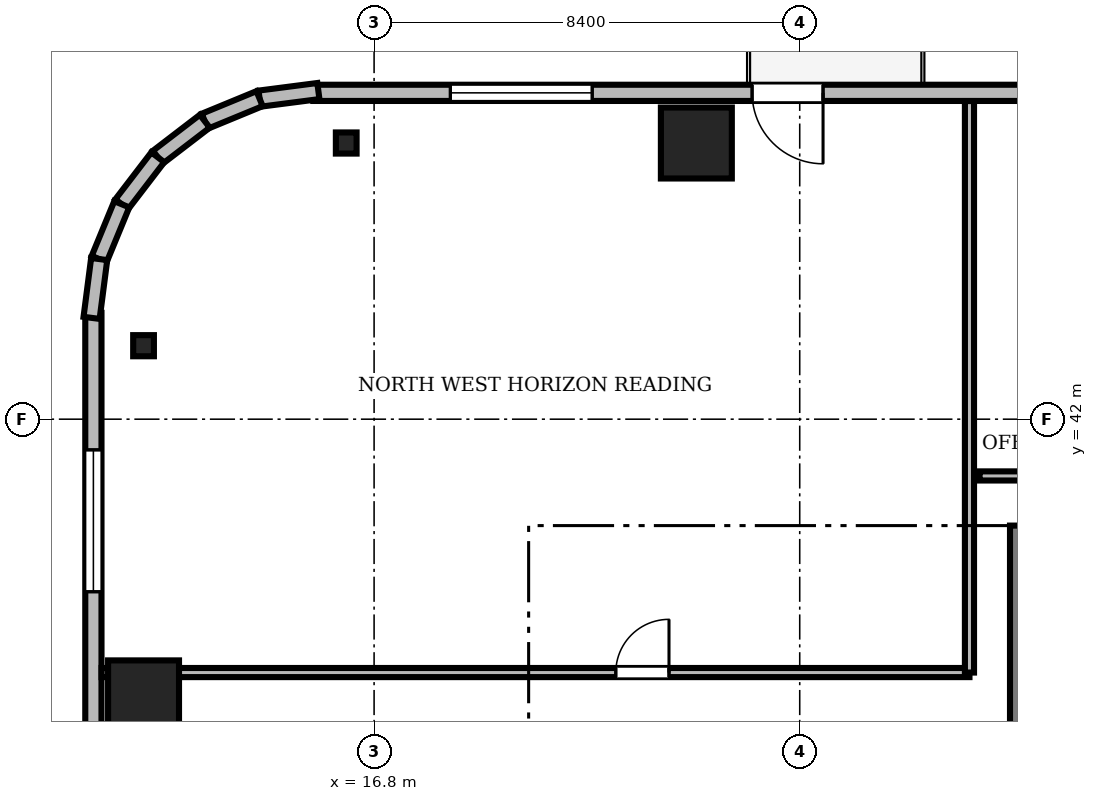
"""IFC4 building model, lengths in metres.
Left out: names, types, materials, properties, quantities, classifications, styles, units other than length and angle.
Written with IfcOpenShell. Run it as: python <this file> out.ifc"""

import sys

from ifc_helpers import new_model, si_unit, direction, frame, frame_2d, origin, origin_2d, place, context, subcontext, project, spatial, rectangle, i_section, extrude, source, transform, mapped, element, fill, save


model = new_model("IFC4")
c1 = context("Model", 3, precision=1e-05, world=origin(), true_north=direction((0.0, 1.0)))
c2 = subcontext(c1, "Body", "Model", "MODEL_VIEW")
j1 = project(units=[si_unit("LENGTHUNIT", "METRE"), si_unit("PLANEANGLEUNIT", "RADIAN")], contexts=[c1])
p1 = place(None, origin())
s1 = spatial("IfcSite", under=j1, at=p1, CompositionType="ELEMENT")
p2 = place(p1, origin())
s2 = spatial("IfcBuilding", under=s1, at=p2, CompositionType="ELEMENT")
p3 = place(p2, frame((0.0, 0.0, 172.2)))
s3 = spatial("IfcBuildingStorey", under=s2, at=p3, CompositionType="ELEMENT", Elevation=172.2)
m1 = source(origin(), c2, "Body", "SweptSolid", [
    extrude(rectangle(XDim=1.4, YDim=1.4, at=origin_2d()), origin(), (0.0, 0.0, 1.0), 4.78),
])
for number, where, z_axis, x_axis in (
    (1, (23.16, 47.45, 0.0), (0.0, 0.0, 1.0), (1.0, 0.0, 0.0)),
    (2, (12.25, 36.54, 0.0), (0.0, 0.0, 1.0), (1.0, 0.0, 0.0)),
):
    element("IfcColumn", number, at=place(p3, frame(where, z_axis=z_axis, x_axis=x_axis)), inside=s3, PredefinedType="COLUMN", context=c2, shape_type="MappedRepresentation", body=[
        mapped(m1, transform((0.0, 0.0, 0.0), scale=1.0)),
    ])
m2 = source(origin(), c2, "Body", "SweptSolid", [
    extrude(i_section(OverallWidth=0.409, OverallDepth=0.417, WebThickness=0.021, FlangeThickness=0.033, FilletRadius=0.015, at=origin_2d()), origin(), (0.0, 0.0, 1.0), 4.78),
])
for number, where, z_axis, x_axis in (
    (3, (16.25, 47.45, 0.0), (0.0, 0.0, 1.0), (1.0, 0.0, 0.0)),
    (4, (12.25, 43.45, 0.0), (0.0, 0.0, 1.0), (1.0, 0.0, 0.0)),
):
    element("IfcColumn", number, at=place(p3, frame(where, z_axis=z_axis, x_axis=x_axis)), inside=s3, PredefinedType="COLUMN", context=c2, shape_type="MappedRepresentation", body=[
        mapped(m2, transform((0.0, 0.0, 0.0), scale=1.0)),
    ])
m3 = source(origin(), c2, "Body", "SweptSolid", [
    extrude(rectangle(XDim=15.6, YDim=0.32, at=frame_2d((7.8, 0.0))), origin(), (0.0, 0.0, 1.0), 4.78),
])
p4 = place(p3, frame((31.2, 48.44, 0.0), z_axis=(0.0, 0.0, 1.0), x_axis=(-1.0, 0.0, 0.0)))
e5 = element("IfcWall", 5, at=p4, inside=s3, PredefinedType="SOLIDWALL", context=c2, shape_type="MappedRepresentation", body=[
    mapped(m3, transform((0.0, 0.0, 0.0), scale=1.0)),
])
m4 = source(origin(), c2, "Body", "SweptSolid", [
    extrude(rectangle(XDim=1.4, YDim=2.3, at=frame_2d((0.7, 1.15))), frame((0.0, 0.17, 0.0), z_axis=(0.0, -1.0, 0.0), x_axis=(1.0, 0.0, 0.0)), (0.0, 0.0, 1.0), 0.34),
])
p5 = place(p4, frame((5.54, 0.0, 0.0)))
e6 = element("IfcOpeningElement", 6, at=p5, cuts=e5, PredefinedType="OPENING", context=c2, shape_type="MappedRepresentation", body=[
    mapped(m4, transform((0.0, 0.0, 0.0), scale=1.0)),
])
m5 = source(origin(), c2, "Body", "SweptSolid", [
    extrude(rectangle(XDim=2.8, YDim=2.4, at=frame_2d((1.4, 1.2))), frame((0.0, 0.17, 0.0), z_axis=(0.0, -1.0, 0.0), x_axis=(1.0, 0.0, 0.0)), (0.0, 0.0, 1.0), 0.34),
])
p6 = place(p4, frame((10.095, 0.0, 0.72)))
e7 = element("IfcOpeningElement", 7, at=p6, cuts=e5, PredefinedType="OPENING", context=c2, shape_type="MappedRepresentation", body=[
    mapped(m5, transform((0.0, 0.0, 0.0), scale=1.0)),
])
m6 = source(origin(), c2, "Body", "SweptSolid", [
    extrude(rectangle(XDim=15.6, YDim=0.32, at=frame_2d((7.8, 0.0))), origin(), (0.0, 0.0, 1.0), 4.78),
])
p7 = place(p3, frame((11.26, 44.1, 0.0), z_axis=(0.0, 0.0, 1.0), x_axis=(0.0, -1.0, 0.0)))
e8 = element("IfcWall", 8, at=p7, inside=s3, PredefinedType="SOLIDWALL", context=c2, shape_type="MappedRepresentation", body=[
    mapped(m6, transform((0.0, 0.0, 0.0), scale=1.0)),
])
p8 = place(p7, frame((9.61, 0.0, 0.0)))
e9 = element("IfcOpeningElement", 9, at=p8, cuts=e8, PredefinedType="OPENING", context=c2, shape_type="MappedRepresentation", body=[
    mapped(m4, transform((0.0, 0.0, 0.0), scale=1.0)),
])
p9 = place(p7, frame((2.705, 0.0, 0.72)))
e10 = element("IfcOpeningElement", 10, at=p9, cuts=e8, PredefinedType="OPENING", context=c2, shape_type="MappedRepresentation", body=[
    mapped(m5, transform((0.0, 0.0, 0.0), scale=1.0)),
])
m7 = source(origin(), c2, "Body", "SweptSolid", [
    extrude(rectangle(XDim=1.17, YDim=0.32, at=frame_2d((0.585, 0.0))), origin(), (0.0, 0.0, 1.0), 4.78),
])
p10 = place(p3, frame((15.7, 48.476, 0.0), z_axis=(0.0, 0.0, 1.0), x_axis=(-0.991735963317, -0.128295670475, 0.0)))
e11 = element("IfcWall", 11, at=p10, inside=s3, PredefinedType="SOLIDWALL", context=c2, shape_type="MappedRepresentation", body=[
    mapped(m7, transform((0.0, 0.0, 0.0), scale=1.0)),
])
m8 = source(origin(), c2, "Body", "SweptSolid", [
    extrude(rectangle(XDim=1.169, YDim=0.32, at=frame_2d((0.584, 0.0))), origin(), (0.0, 0.0, 1.0), 4.78),
])
p11 = place(p3, frame((14.54, 48.325, 0.0), z_axis=(0.0, 0.0, 1.0), x_axis=(-0.924552646638, -0.381054331552, 0.0)))
e12 = element("IfcWall", 12, at=p11, inside=s3, PredefinedType="SOLIDWALL", context=c2, shape_type="MappedRepresentation", body=[
    mapped(m8, transform((0.0, 0.0, 0.0), scale=1.0)),
])
m9 = source(origin(), c2, "Body", "SweptSolid", [
    extrude(rectangle(XDim=1.169, YDim=0.32, at=frame_2d((0.584, 0.0))), origin(), (0.0, 0.0, 1.0), 4.78),
])
p12 = place(p3, frame((13.459, 47.88, 0.0), z_axis=(0.0, 0.0, 1.0), x_axis=(-0.793663520347, -0.608356981114, 0.0)))
e13 = element("IfcWall", 13, at=p12, inside=s3, PredefinedType="SOLIDWALL", context=c2, shape_type="MappedRepresentation", body=[
    mapped(m9, transform((0.0, 0.0, 0.0), scale=1.0)),
])
m10 = source(origin(), c2, "Body", "SweptSolid", [
    extrude(rectangle(XDim=1.169, YDim=0.32, at=frame_2d((0.584, 0.0))), origin(), (0.0, 0.0, 1.0), 4.78),
])
p13 = place(p3, frame((12.531, 47.169, 0.0), z_axis=(0.0, 0.0, 1.0), x_axis=(-0.608387696831, -0.793639975269, 0.0)))
e14 = element("IfcWall", 14, at=p13, inside=s3, PredefinedType="SOLIDWALL", context=c2, shape_type="MappedRepresentation", body=[
    mapped(m10, transform((0.0, 0.0, 0.0), scale=1.0)),
])
p14 = place(p3, frame((11.82, 46.241, 0.0), z_axis=(0.0, 0.0, 1.0), x_axis=(-0.381054331552, -0.924552646638, 0.0)))
e15 = element("IfcWall", 15, at=p14, inside=s3, PredefinedType="SOLIDWALL", context=c2, shape_type="MappedRepresentation", body=[
    mapped(m8, transform((0.0, 0.0, 0.0), scale=1.0)),
])
p15 = place(p3, frame((11.375, 45.16, 0.0), z_axis=(0.0, 0.0, 1.0), x_axis=(-0.128295670475, -0.991735963317, 0.0)))
e16 = element("IfcWall", 16, at=p15, inside=s3, PredefinedType="SOLIDWALL", context=c2, shape_type="MappedRepresentation", body=[
    mapped(m7, transform((0.0, 0.0, 0.0), scale=1.0)),
])
m11 = source(origin(), c2, "Body", "SweptSolid", [
    extrude(rectangle(XDim=9.25, YDim=0.25, at=frame_2d((4.625, 0.0))), origin(), (0.0, 0.0, 1.0), 4.8),
])
p16 = place(p3, frame((29.475, 30.65, 0.0), z_axis=(0.0, 0.0, 1.0), x_axis=(0.0, 1.0, 0.0)))
e17 = element("IfcWall", 17, at=p16, inside=s3, PredefinedType="SOLIDWALL", context=c2, shape_type="MappedRepresentation", body=[
    mapped(m11, transform((0.0, 0.0, 0.0), scale=1.0)),
])
m12 = source(origin(), c2, "Body", "SweptSolid", [
    extrude(rectangle(XDim=28.8, YDim=0.18, at=frame_2d((14.4, 0.0))), origin(), (0.0, 0.0, 1.0), 4.022),
])
p17 = place(p3, frame((28.75, 40.88, 0.0), z_axis=(0.0, 0.0, 1.0), x_axis=(1.0, 0.0, 0.0)))
e18 = element("IfcWall", 18, at=p17, inside=s3, PredefinedType="PARTITIONING", context=c2, shape_type="MappedRepresentation", body=[
    mapped(m12, transform((0.0, 0.0, 0.0), scale=1.0)),
])
m13 = source(origin(), c2, "Body", "SweptSolid", [
    extrude(rectangle(XDim=1.05, YDim=2.2, at=frame_2d((0.525, 1.1))), frame((0.0, 0.1, 0.0), z_axis=(0.0, -1.0, 0.0), x_axis=(1.0, 0.0, 0.0)), (0.0, 0.0, 1.0), 0.2),
])
p18 = place(p17, frame((20.25, 0.0, 0.0)))
e19 = element("IfcOpeningElement", 19, at=p18, cuts=e18, PredefinedType="OPENING", context=c2, shape_type="MappedRepresentation", body=[
    mapped(m13, transform((0.0, 0.0, 0.0), scale=1.0)),
])
m14 = source(origin(), c2, "Body", "SweptSolid", [
    extrude(rectangle(XDim=17.128, YDim=0.18, at=frame_2d((8.564, 0.0))), origin(), (0.0, 0.0, 1.0), 4.022),
])
p19 = place(p3, frame((11.422, 37.0, 0.0), z_axis=(0.0, 0.0, 1.0), x_axis=(1.0, 0.0, 0.0)))
e20 = element("IfcWall", 20, at=p19, inside=s3, PredefinedType="PARTITIONING", context=c2, shape_type="MappedRepresentation", body=[
    mapped(m14, transform((0.0, 0.0, 0.0), scale=1.0)),
])
p20 = place(p19, frame((10.148, 0.0, 0.0)))
e21 = element("IfcOpeningElement", 21, at=p20, cuts=e20, PredefinedType="OPENING", context=c2, shape_type="MappedRepresentation", body=[
    mapped(m13, transform((0.0, 0.0, 0.0), scale=1.0)),
])
m15 = source(origin(), c2, "Body", "SweptSolid", [
    extrude(rectangle(XDim=11.278, YDim=0.18, at=frame_2d((5.639, 0.0))), origin(), (0.0, 0.0, 1.0), 4.022),
])
p21 = place(p3, frame((28.55, 37.0, 0.0), z_axis=(0.0, 0.0, 1.0), x_axis=(0.0, 1.0, 0.0)))
e22 = element("IfcWall", 22, at=p21, inside=s3, PredefinedType="PARTITIONING", context=c2, shape_type="MappedRepresentation", body=[
    mapped(m15, transform((0.0, 0.0, 0.0), scale=1.0)),
])
m16 = source(origin(), c2, "Body", "SweptSolid", [
    extrude(rectangle(XDim=1.4, YDim=2.3, at=frame_2d((0.7, 1.15))), frame((0.0, 0.025, 0.0), z_axis=(0.0, -1.0, 0.0), x_axis=(1.0, 0.0, 0.0)), (0.0, 0.0, 1.0), 0.05),
])
p22 = place(p5, frame((1.4, 0.0, 0.0), z_axis=(0.0, 0.0, 1.0), x_axis=(-1.0, 0.0, 0.0)))
e23 = element("IfcDoor", 23, at=p22, inside=s3, OperationType="DOUBLE_DOOR_SLIDING", PredefinedType="DOOR", context=c2, shape_type="MappedRepresentation", body=[
    mapped(m16, transform((0.0, 0.0, 0.0), scale=1.0)),
])
fill(e6, e23)
m17 = source(origin(), c2, "Body", "SweptSolid", [
    extrude(rectangle(XDim=2.8, YDim=2.4, at=frame_2d((1.4, 1.2))), frame((0.0, 0.03, 0.0), z_axis=(0.0, -1.0, 0.0), x_axis=(1.0, 0.0, 0.0)), (0.0, 0.0, 1.0), 0.06),
])
p23 = place(p6, origin())
e24 = element("IfcWindow", 24, at=p23, inside=s3, PartitioningType="SINGLE_PANEL", PredefinedType="WINDOW", context=c2, shape_type="MappedRepresentation", body=[
    mapped(m17, transform((0.0, 0.0, 0.0), scale=1.0)),
])
fill(e7, e24)
p24 = place(p9, origin())
e25 = element("IfcWindow", 25, at=p24, inside=s3, PartitioningType="SINGLE_PANEL", PredefinedType="WINDOW", context=c2, shape_type="MappedRepresentation", body=[
    mapped(m17, transform((0.0, 0.0, 0.0), scale=1.0)),
])
fill(e10, e25)
m18 = source(origin(), c2, "Body", "SweptSolid", [
    extrude(rectangle(XDim=1.05, YDim=2.2, at=frame_2d((0.525, 1.1))), frame((0.0, 0.025, 0.0), z_axis=(0.0, -1.0, 0.0), x_axis=(1.0, 0.0, 0.0)), (0.0, 0.0, 1.0), 0.05),
])
p25 = place(p20, origin())
e26 = element("IfcDoor", 26, at=p25, inside=s3, OperationType="SINGLE_SWING_RIGHT", PredefinedType="DOOR", context=c2, shape_type="MappedRepresentation", body=[
    mapped(m18, transform((0.0, 0.0, 0.0), scale=1.0)),
])
fill(e21, e26)
save(model, sys.argv[1])
